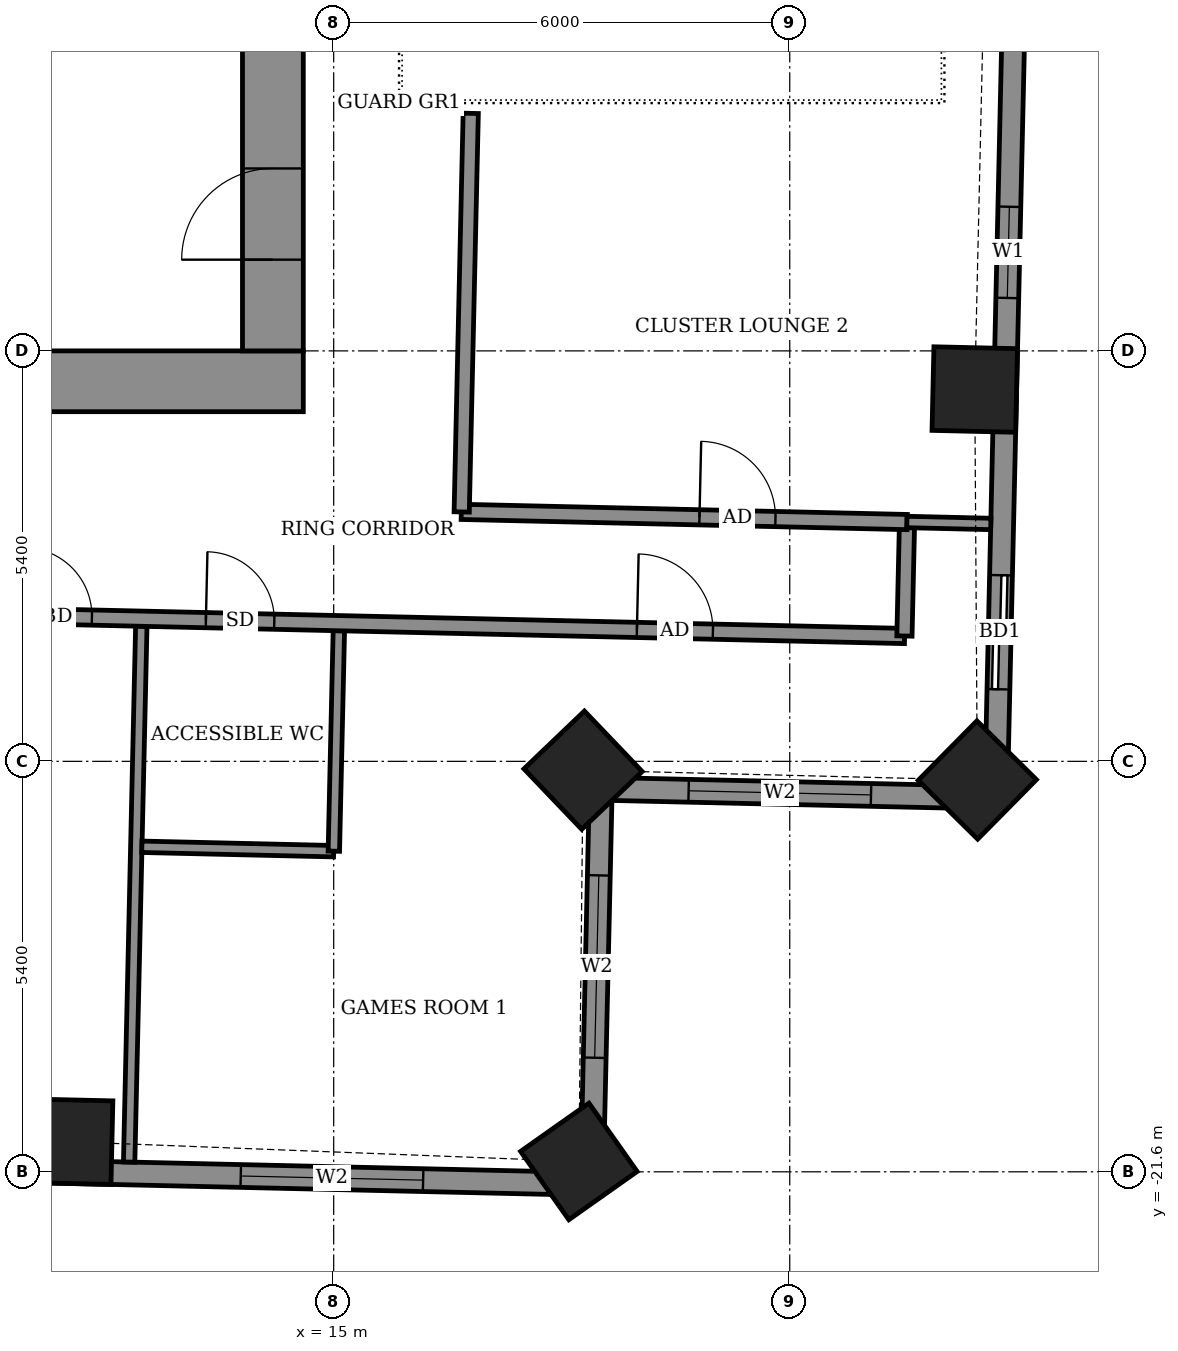
"""IFC4 building model, lengths in metres.
Left out: names, types, materials, properties, quantities, classifications, styles, units other than length and angle.
Written with IfcOpenShell. Run it as: python <this file> out.ifc"""

import sys

from ifc_helpers import new_model, si_unit, direction, frame, frame_2d, origin, origin_2d, place, context, subcontext, project, spatial, rectangle, extrude, element, fill, save


model = new_model("IFC4")
c1 = context("Model", 3, precision=1e-05, world=origin(), true_north=direction((0.0, 1.0)))
c2 = subcontext(c1, "Body", "Model", "MODEL_VIEW")
j1 = project(units=[si_unit("LENGTHUNIT", "METRE"), si_unit("PLANEANGLEUNIT", "RADIAN")], contexts=[c1])
p1 = place(None, origin())
s1 = spatial("IfcSite", under=j1, at=p1, CompositionType="ELEMENT")
p2 = place(p1, origin())
s2 = spatial("IfcBuilding", under=s1, at=p2, CompositionType="ELEMENT")
p3 = place(p2, frame((0.0, 0.0, 208.7)))
s3 = spatial("IfcBuildingStorey", under=s2, at=p3, CompositionType="ELEMENT", Elevation=208.7)
for number, where, z_axis, x_axis in (
    (1, (11.532, -21.204, -0.55), (0.0, 0.0, 1.0), (1.0, -0.023, 0.0)),
    (2, (18.226, -21.464, -0.55), (0.0, 0.0, 1.0), (0.817, 0.577, 0.0)),
    (3, (18.281, -16.316, -0.55), (0.0, 0.0, 1.0), (0.723, 0.691, 0.0)),
    (4, (23.468, -16.446, -0.55), (0.0, 0.0, 1.0), (0.702, 0.712, 0.0)),
    (5, (23.434, -11.309, -0.55), (0.0, 0.0, 1.0), (0.023, 1.0, 0.0)),
):
    element("IfcColumn", number, at=place(p3, frame(where, z_axis=z_axis, x_axis=x_axis)), inside=s3, PredefinedType="COLUMN", context=c2, shape_type="SweptSolid", body=[
        extrude(rectangle(XDim=1.1, YDim=1.1, at=origin_2d()), origin(), (0.0, 0.0, 1.0), 3.6),
    ])
p4 = place(p3, frame((23.713, -16.679, 0.0), z_axis=(0.0, 0.0, 1.0), x_axis=(0.022674801414, 0.999742893639, 0.0)))
e6 = element("IfcWall", 6, at=p4, inside=s3, PredefinedType="SOLIDWALL", context=c2, shape_type="SweptSolid", body=[
    extrude(rectangle(XDim=11.424, YDim=0.3, at=frame_2d((5.712, 0.0))), origin(), (0.0, 0.0, 1.0), 2.55),
])
p5 = place(p4, frame((1.428, 0.0, 0.0)))
e7 = element("IfcOpeningElement", 7, at=p5, cuts=e6, PredefinedType="OPENING", context=c2, shape_type="SweptSolid", body=[
    extrude(rectangle(XDim=1.5, YDim=2.4, at=frame_2d((0.75, 1.2))), frame((0.0, 0.16, 0.0), z_axis=(0.0, -1.0, 0.0), x_axis=(1.0, 0.0, 0.0)), (0.0, 0.0, 1.0), 0.32),
])
p6 = place(p4, frame((6.577, 0.0, 0.9)))
e8 = element("IfcOpeningElement", 8, at=p6, cuts=e6, PredefinedType="OPENING", context=c2, shape_type="SweptSolid", body=[
    extrude(rectangle(XDim=1.2, YDim=1.5, at=frame_2d((0.6, 0.75))), frame((0.0, 0.16, 0.0), z_axis=(0.0, -1.0, 0.0), x_axis=(1.0, 0.0, 0.0)), (0.0, 0.0, 1.0), 0.32),
])
p7 = place(p3, frame((-23.437, -20.81, 0.0), z_axis=(0.0, 0.0, 1.0), x_axis=(0.999742269115, -0.022702320244, 0.0)))
e9 = element("IfcWall", 9, at=p7, inside=s3, PredefinedType="SOLIDWALL", context=c2, shape_type="SweptSolid", body=[
    extrude(rectangle(XDim=41.844, YDim=0.3, at=frame_2d((20.922, 0.0))), origin(), (0.0, 0.0, 1.0), 2.55),
])
p8 = place(p7, frame((1.825, 0.0, 0.0)))
e10 = element("IfcOpeningElement", 10, at=p8, cuts=e9, PredefinedType="OPENING", context=c2, shape_type="SweptSolid", body=[
    extrude(rectangle(XDim=1.5, YDim=2.4, at=frame_2d((0.75, 1.2))), frame((0.0, 0.16, 0.0), z_axis=(0.0, -1.0, 0.0), x_axis=(1.0, 0.0, 0.0)), (0.0, 0.0, 1.0), 0.32),
])
p9 = place(p7, frame((4.937, 0.0, 0.0)))
e11 = element("IfcOpeningElement", 11, at=p9, cuts=e9, PredefinedType="OPENING", context=c2, shape_type="SweptSolid", body=[
    extrude(rectangle(XDim=1.2, YDim=2.4, at=frame_2d((0.6, 1.2))), frame((0.0, 0.16, 0.0), z_axis=(0.0, -1.0, 0.0), x_axis=(1.0, 0.0, 0.0)), (0.0, 0.0, 1.0), 0.32),
])
p10 = place(p7, frame((10.3, 0.0, 0.0)))
e12 = element("IfcOpeningElement", 12, at=p10, cuts=e9, PredefinedType="OPENING", context=c2, shape_type="SweptSolid", body=[
    extrude(rectangle(XDim=1.5, YDim=2.4, at=frame_2d((0.75, 1.2))), frame((0.0, 0.16, 0.0), z_axis=(0.0, -1.0, 0.0), x_axis=(1.0, 0.0, 0.0)), (0.0, 0.0, 1.0), 0.32),
])
p11 = place(p7, frame((15.224, 0.0, 0.0)))
e13 = element("IfcOpeningElement", 13, at=p11, cuts=e9, PredefinedType="OPENING", context=c2, shape_type="SweptSolid", body=[
    extrude(rectangle(XDim=1.5, YDim=2.4, at=frame_2d((0.75, 1.2))), frame((0.0, 0.16, 0.0), z_axis=(0.0, -1.0, 0.0), x_axis=(1.0, 0.0, 0.0)), (0.0, 0.0, 1.0), 0.32),
])
p12 = place(p7, frame((18.436, 0.0, 0.0)))
e14 = element("IfcOpeningElement", 14, at=p12, cuts=e9, PredefinedType="OPENING", context=c2, shape_type="SweptSolid", body=[
    extrude(rectangle(XDim=1.5, YDim=2.4, at=frame_2d((0.75, 1.2))), frame((0.0, 0.16, 0.0), z_axis=(0.0, -1.0, 0.0), x_axis=(1.0, 0.0, 0.0)), (0.0, 0.0, 1.0), 0.32),
])
p13 = place(p7, frame((23.825, 0.0, 0.0)))
e15 = element("IfcOpeningElement", 15, at=p13, cuts=e9, PredefinedType="OPENING", context=c2, shape_type="SweptSolid", body=[
    extrude(rectangle(XDim=1.5, YDim=2.4, at=frame_2d((0.75, 1.2))), frame((0.0, 0.16, 0.0), z_axis=(0.0, -1.0, 0.0), x_axis=(1.0, 0.0, 0.0)), (0.0, 0.0, 1.0), 0.32),
])
p14 = place(p7, frame((28.948, 0.0, 0.0)))
e16 = element("IfcOpeningElement", 16, at=p14, cuts=e9, PredefinedType="OPENING", context=c2, shape_type="SweptSolid", body=[
    extrude(rectangle(XDim=1.5, YDim=2.4, at=frame_2d((0.75, 1.2))), frame((0.0, 0.16, 0.0), z_axis=(0.0, -1.0, 0.0), x_axis=(1.0, 0.0, 0.0)), (0.0, 0.0, 1.0), 0.32),
])
p15 = place(p7, frame((32.16, 0.0, 0.0)))
e17 = element("IfcOpeningElement", 17, at=p15, cuts=e9, PredefinedType="OPENING", context=c2, shape_type="SweptSolid", body=[
    extrude(rectangle(XDim=1.5, YDim=2.4, at=frame_2d((0.75, 1.2))), frame((0.0, 0.16, 0.0), z_axis=(0.0, -1.0, 0.0), x_axis=(1.0, 0.0, 0.0)), (0.0, 0.0, 1.0), 0.32),
])
p16 = place(p7, frame((37.224, 0.0, 0.9)))
e18 = element("IfcOpeningElement", 18, at=p16, cuts=e9, PredefinedType="OPENING", context=c2, shape_type="SweptSolid", body=[
    extrude(rectangle(XDim=2.4, YDim=1.5, at=frame_2d((1.2, 0.75))), frame((0.0, 0.16, 0.0), z_axis=(0.0, -1.0, 0.0), x_axis=(1.0, 0.0, 0.0)), (0.0, 0.0, 1.0), 0.32),
])
p17 = place(p3, frame((18.396, -21.76, 0.0), z_axis=(0.0, 0.0, 1.0), x_axis=(0.022675548694, 0.99974287669, 0.0)))
e19 = element("IfcWall", 19, at=p17, inside=s3, PredefinedType="SOLIDWALL", context=c2, shape_type="SweptSolid", body=[
    extrude(rectangle(XDim=5.2, YDim=0.3, at=frame_2d((2.6, 0.0))), origin(), (0.0, 0.0, 1.0), 2.55),
])
p18 = place(p17, frame((1.661, 0.0, 0.9)))
e20 = element("IfcOpeningElement", 20, at=p18, cuts=e19, PredefinedType="OPENING", context=c2, shape_type="SweptSolid", body=[
    extrude(rectangle(XDim=2.4, YDim=1.5, at=frame_2d((1.2, 0.75))), frame((0.0, 0.16, 0.0), z_axis=(0.0, -1.0, 0.0), x_axis=(1.0, 0.0, 0.0)), (0.0, 0.0, 1.0), 0.32),
])
p19 = place(p3, frame((18.514, -16.561, 0.0), z_axis=(0.0, 0.0, 1.0), x_axis=(0.99974287669, -0.022675548694, 0.0)))
e21 = element("IfcWall", 21, at=p19, inside=s3, PredefinedType="SOLIDWALL", context=c2, shape_type="SweptSolid", body=[
    extrude(rectangle(XDim=5.2, YDim=0.3, at=frame_2d((2.6, 0.0))), origin(), (0.0, 0.0, 1.0), 2.55),
])
p20 = place(p19, frame((1.156, 0.0, 0.9)))
e22 = element("IfcOpeningElement", 22, at=p20, cuts=e21, PredefinedType="OPENING", context=c2, shape_type="SweptSolid", body=[
    extrude(rectangle(XDim=2.4, YDim=1.5, at=frame_2d((1.2, 0.75))), frame((0.0, 0.16, 0.0), z_axis=(0.0, -1.0, 0.0), x_axis=(1.0, 0.0, 0.0)), (0.0, 0.0, 1.0), 0.32),
])
p21 = place(p3, frame((12.309, -21.472, 0.0), z_axis=(0.0, 0.0, 1.0), x_axis=(0.022680503969, 0.999742764285, 0.0)))
e23 = element("IfcWall", 23, at=p21, inside=s3, PredefinedType="PARTITIONING", context=c2, shape_type="SweptSolid", body=[
    extrude(rectangle(XDim=7.051, YDim=0.15, at=frame_2d((3.525, 0.0))), origin(), (0.0, 0.0, 1.0), 2.55),
])
p22 = place(p3, frame((12.476, -17.324, 0.0), z_axis=(0.0, 0.0, 1.0), x_axis=(0.999735102249, -0.023015762656, 0.0)))
e24 = element("IfcWall", 24, at=p22, inside=s3, PredefinedType="PARTITIONING", context=c2, shape_type="SweptSolid", body=[
    extrude(rectangle(XDim=2.525, YDim=0.15, at=frame_2d((1.262, 0.0))), origin(), (0.0, 0.0, 1.0), 3.05),
])
p23 = place(p3, frame((15.002, -17.382, 0.0), z_axis=(0.0, 0.0, 1.0), x_axis=(0.022807433839, 0.999739876649, 0.0)))
e25 = element("IfcWall", 25, at=p23, inside=s3, PredefinedType="PARTITIONING", context=c2, shape_type="SweptSolid", body=[
    extrude(rectangle(XDim=2.901, YDim=0.15, at=frame_2d((1.45, 0.0))), origin(), (0.0, 0.0, 1.0), 3.05),
])
p24 = place(p3, frame((-26.421, -13.441, 0.0), z_axis=(0.0, 0.0, 1.0), x_axis=(0.999742754064, -0.022680954485, 0.0)))
e26 = element("IfcWall", 26, at=p24, inside=s3, PredefinedType="PARTITIONING", context=c2, shape_type="SweptSolid", body=[
    extrude(rectangle(XDim=48.945, YDim=0.2, at=frame_2d((24.472, 0.0))), origin(), (0.0, 0.0, 1.0), 3.05),
])
p25 = place(p24, frame((1.425, 0.0, 0.0)))
e27 = element("IfcOpeningElement", 27, at=p25, cuts=e26, PredefinedType="OPENING", context=c2, shape_type="SweptSolid", body=[
    extrude(rectangle(XDim=1.0, YDim=2.1, at=frame_2d((0.5, 1.05))), frame((0.0, 0.11, 0.0), z_axis=(0.0, -1.0, 0.0), x_axis=(1.0, 0.0, 0.0)), (0.0, 0.0, 1.0), 0.22),
])
p26 = place(p24, frame((6.0, 0.0, 0.0)))
e28 = element("IfcOpeningElement", 28, at=p26, cuts=e26, PredefinedType="OPENING", context=c2, shape_type="SweptSolid", body=[
    extrude(rectangle(XDim=0.9, YDim=2.1, at=frame_2d((0.45, 1.05))), frame((0.0, 0.11, 0.0), z_axis=(0.0, -1.0, 0.0), x_axis=(1.0, 0.0, 0.0)), (0.0, 0.0, 1.0), 0.22),
])
p27 = place(p24, frame((10.55, 0.0, 0.0)))
e29 = element("IfcOpeningElement", 29, at=p27, cuts=e26, PredefinedType="OPENING", context=c2, shape_type="SweptSolid", body=[
    extrude(rectangle(XDim=0.9, YDim=2.1, at=frame_2d((0.45, 1.05))), frame((0.0, 0.11, 0.0), z_axis=(0.0, -1.0, 0.0), x_axis=(1.0, 0.0, 0.0)), (0.0, 0.0, 1.0), 0.22),
])
p28 = place(p24, frame((12.55, 0.0, 0.0)))
e30 = element("IfcOpeningElement", 30, at=p28, cuts=e26, PredefinedType="OPENING", context=c2, shape_type="SweptSolid", body=[
    extrude(rectangle(XDim=0.9, YDim=2.1, at=frame_2d((0.45, 1.05))), frame((0.0, 0.11, 0.0), z_axis=(0.0, -1.0, 0.0), x_axis=(1.0, 0.0, 0.0)), (0.0, 0.0, 1.0), 0.22),
])
p29 = place(p24, frame((19.425, 0.0, 0.0)))
e31 = element("IfcOpeningElement", 31, at=p29, cuts=e26, PredefinedType="OPENING", context=c2, shape_type="SweptSolid", body=[
    extrude(rectangle(XDim=0.9, YDim=2.1, at=frame_2d((0.45, 1.05))), frame((0.0, 0.11, 0.0), z_axis=(0.0, -1.0, 0.0), x_axis=(1.0, 0.0, 0.0)), (0.0, 0.0, 1.0), 0.22),
])
p30 = place(p24, frame((21.525, 0.0, 0.0)))
e32 = element("IfcOpeningElement", 32, at=p30, cuts=e26, PredefinedType="OPENING", context=c2, shape_type="SweptSolid", body=[
    extrude(rectangle(XDim=0.9, YDim=2.1, at=frame_2d((0.45, 1.05))), frame((0.0, 0.11, 0.0), z_axis=(0.0, -1.0, 0.0), x_axis=(1.0, 0.0, 0.0)), (0.0, 0.0, 1.0), 0.22),
])
p31 = place(p24, frame((28.475, 0.0, 0.0)))
e33 = element("IfcOpeningElement", 33, at=p31, cuts=e26, PredefinedType="OPENING", context=c2, shape_type="SweptSolid", body=[
    extrude(rectangle(XDim=0.9, YDim=2.1, at=frame_2d((0.45, 1.05))), frame((0.0, 0.11, 0.0), z_axis=(0.0, -1.0, 0.0), x_axis=(1.0, 0.0, 0.0)), (0.0, 0.0, 1.0), 0.22),
])
p32 = place(p24, frame((30.5, 0.0, 0.0)))
e34 = element("IfcOpeningElement", 34, at=p32, cuts=e26, PredefinedType="OPENING", context=c2, shape_type="SweptSolid", body=[
    extrude(rectangle(XDim=0.9, YDim=2.1, at=frame_2d((0.45, 1.05))), frame((0.0, 0.11, 0.0), z_axis=(0.0, -1.0, 0.0), x_axis=(1.0, 0.0, 0.0)), (0.0, 0.0, 1.0), 0.22),
])
p33 = place(p24, frame((37.35, 0.0, 0.0)))
e35 = element("IfcOpeningElement", 35, at=p33, cuts=e26, PredefinedType="OPENING", context=c2, shape_type="SweptSolid", body=[
    extrude(rectangle(XDim=0.9, YDim=2.1, at=frame_2d((0.45, 1.05))), frame((0.0, 0.11, 0.0), z_axis=(0.0, -1.0, 0.0), x_axis=(1.0, 0.0, 0.0)), (0.0, 0.0, 1.0), 0.22),
])
p34 = place(p24, frame((45.422, 0.0, 0.0)))
e36 = element("IfcOpeningElement", 36, at=p34, cuts=e26, PredefinedType="OPENING", context=c2, shape_type="SweptSolid", body=[
    extrude(rectangle(XDim=1.0, YDim=2.1, at=frame_2d((0.5, 1.05))), frame((0.0, 0.11, 0.0), z_axis=(0.0, -1.0, 0.0), x_axis=(1.0, 0.0, 0.0)), (0.0, 0.0, 1.0), 0.22),
])
p35 = place(p24, frame((39.75, 0.0, 0.0)))
e37 = element("IfcOpeningElement", 37, at=p35, cuts=e26, PredefinedType="OPENING", context=c2, shape_type="SweptSolid", body=[
    extrude(rectangle(XDim=0.9, YDim=2.1, at=frame_2d((0.45, 1.05))), frame((0.0, 0.11, 0.0), z_axis=(0.0, -1.0, 0.0), x_axis=(1.0, 0.0, 0.0)), (0.0, 0.0, 1.0), 0.22),
])
p36 = place(p3, frame((22.509, -14.551, 0.0), z_axis=(0.0, 0.0, 1.0), x_axis=(0.022632637625, 0.99974384905, 0.0)))
e38 = element("IfcWall", 38, at=p36, inside=s3, PredefinedType="PARTITIONING", context=c2, shape_type="SweptSolid", body=[
    extrude(rectangle(XDim=1.5, YDim=0.2, at=frame_2d((0.75, 0.0))), origin(), (0.0, 0.0, 1.0), 3.05),
])
p37 = place(p3, frame((16.679, -12.918, 0.0), z_axis=(0.0, 0.0, 1.0), x_axis=(0.999739057042, -0.022843332181, 0.0)))
e39 = element("IfcWall", 39, at=p37, inside=s3, PredefinedType="PARTITIONING", context=c2, shape_type="SweptSolid", body=[
    extrude(rectangle(XDim=5.867, YDim=0.2, at=frame_2d((2.934, 0.0))), origin(), (0.0, 0.0, 1.0), 3.05),
])
p38 = place(p37, frame((3.134, 0.0, 0.0)))
e40 = element("IfcOpeningElement", 40, at=p38, cuts=e39, PredefinedType="OPENING", context=c2, shape_type="SweptSolid", body=[
    extrude(rectangle(XDim=1.0, YDim=2.1, at=frame_2d((0.5, 1.05))), frame((0.0, 0.11, 0.0), z_axis=(0.0, -1.0, 0.0), x_axis=(1.0, 0.0, 0.0)), (0.0, 0.0, 1.0), 0.22),
])
p39 = place(p3, frame((16.684, -12.919, 0.0), z_axis=(0.0, 0.0, 1.0), x_axis=(0.022667483124, 0.999743059595, 0.0)))
e41 = element("IfcWall", 41, at=p39, inside=s3, PredefinedType="PARTITIONING", context=c2, shape_type="SweptSolid", body=[
    extrude(rectangle(XDim=5.245, YDim=0.2, at=frame_2d((2.623, 0.0))), origin(), (0.0, 0.0, 1.0), 3.05),
])
p40 = place(p3, frame((22.541, -13.051, 0.0), z_axis=(0.0, 0.0, 1.0), x_axis=(0.999725373977, -0.023434517833, 0.0)))
e42 = element("IfcWall", 42, at=p40, inside=s3, PredefinedType="PARTITIONING", context=c2, shape_type="SweptSolid", body=[
    extrude(rectangle(XDim=1.104, YDim=0.15, at=frame_2d((0.552, 0.0))), origin(), (0.0, 0.0, 1.0), 2.55),
])
p41 = place(p3, frame((-14.6, -11.2, 0.0), z_axis=(0.0, 0.0, 1.0), x_axis=(1.0, 0.0, 0.0)))
e43 = element("IfcWall", 43, at=p41, inside=s3, PredefinedType="SHEAR", context=c2, shape_type="SweptSolid", body=[
    extrude(rectangle(XDim=29.2, YDim=0.8, at=frame_2d((14.6, 0.0))), origin(), (0.0, 0.0, 1.0), 3.6),
])
p42 = place(p3, frame((14.2, -10.8, 0.0), z_axis=(0.0, 0.0, 1.0), x_axis=(0.0, 1.0, 0.0)))
e44 = element("IfcWall", 44, at=p42, inside=s3, PredefinedType="SHEAR", context=c2, shape_type="SweptSolid", body=[
    extrude(rectangle(XDim=21.6, YDim=0.8, at=frame_2d((10.8, 0.0))), origin(), (0.0, 0.0, 1.0), 3.6),
])
p43 = place(p42, frame((1.2, 0.0, 0.0)))
e45 = element("IfcOpeningElement", 45, at=p43, cuts=e44, PredefinedType="OPENING", context=c2, shape_type="SweptSolid", body=[
    extrude(rectangle(XDim=1.2, YDim=2.1, at=frame_2d((0.6, 1.05))), frame((0.0, 0.41, 0.0), z_axis=(0.0, -1.0, 0.0), x_axis=(1.0, 0.0, 0.0)), (0.0, 0.0, 1.0), 0.82),
])
p44 = place(p5, origin())
e46 = element("IfcDoor", 46, at=p44, inside=s3, OperationType="SLIDING_TO_LEFT", PredefinedType="DOOR", context=c2, shape_type="SweptSolid", body=[
    extrude(rectangle(XDim=1.5, YDim=2.4, at=frame_2d((0.75, 1.2))), frame((0.0, 0.025, 0.0), z_axis=(0.0, -1.0, 0.0), x_axis=(1.0, 0.0, 0.0)), (0.0, 0.0, 1.0), 0.05),
])
fill(e7, e46)
p45 = place(p6, origin())
e47 = element("IfcWindow", 47, at=p45, inside=s3, PartitioningType="SINGLE_PANEL", PredefinedType="WINDOW", context=c2, shape_type="SweptSolid", body=[
    extrude(rectangle(XDim=1.2, YDim=1.5, at=frame_2d((0.6, 0.75))), frame((0.0, 0.03, 0.0), z_axis=(0.0, -1.0, 0.0), x_axis=(1.0, 0.0, 0.0)), (0.0, 0.0, 1.0), 0.06),
])
fill(e8, e47)
p46 = place(p16, origin())
e48 = element("IfcWindow", 48, at=p46, inside=s3, PartitioningType="DOUBLE_PANEL_VERTICAL", PredefinedType="WINDOW", context=c2, shape_type="SweptSolid", body=[
    extrude(rectangle(XDim=2.4, YDim=1.5, at=frame_2d((1.2, 0.75))), frame((0.0, 0.03, 0.0), z_axis=(0.0, -1.0, 0.0), x_axis=(1.0, 0.0, 0.0)), (0.0, 0.0, 1.0), 0.06),
])
fill(e18, e48)
p47 = place(p18, origin())
e49 = element("IfcWindow", 49, at=p47, inside=s3, PartitioningType="DOUBLE_PANEL_VERTICAL", PredefinedType="WINDOW", context=c2, shape_type="SweptSolid", body=[
    extrude(rectangle(XDim=2.4, YDim=1.5, at=frame_2d((1.2, 0.75))), frame((0.0, 0.03, 0.0), z_axis=(0.0, -1.0, 0.0), x_axis=(1.0, 0.0, 0.0)), (0.0, 0.0, 1.0), 0.06),
])
fill(e20, e49)
p48 = place(p20, origin())
e50 = element("IfcWindow", 50, at=p48, inside=s3, PartitioningType="DOUBLE_PANEL_VERTICAL", PredefinedType="WINDOW", context=c2, shape_type="SweptSolid", body=[
    extrude(rectangle(XDim=2.4, YDim=1.5, at=frame_2d((1.2, 0.75))), frame((0.0, 0.03, 0.0), z_axis=(0.0, -1.0, 0.0), x_axis=(1.0, 0.0, 0.0)), (0.0, 0.0, 1.0), 0.06),
])
fill(e22, e50)
p49 = place(p33, origin())
e51 = element("IfcDoor", 51, at=p49, inside=s3, OperationType="SINGLE_SWING_LEFT", PredefinedType="DOOR", context=c2, shape_type="SweptSolid", body=[
    extrude(rectangle(XDim=0.9, YDim=2.1, at=frame_2d((0.45, 1.05))), frame((0.0, 0.025, 0.0), z_axis=(0.0, -1.0, 0.0), x_axis=(1.0, 0.0, 0.0)), (0.0, 0.0, 1.0), 0.05),
])
fill(e35, e51)
p50 = place(p34, origin())
e52 = element("IfcDoor", 52, at=p50, inside=s3, OperationType="SINGLE_SWING_RIGHT", PredefinedType="DOOR", context=c2, shape_type="SweptSolid", body=[
    extrude(rectangle(XDim=1.0, YDim=2.1, at=frame_2d((0.5, 1.05))), frame((0.0, 0.025, 0.0), z_axis=(0.0, -1.0, 0.0), x_axis=(1.0, 0.0, 0.0)), (0.0, 0.0, 1.0), 0.05),
])
fill(e36, e52)
p51 = place(p35, origin())
e53 = element("IfcDoor", 53, at=p51, inside=s3, OperationType="SINGLE_SWING_RIGHT", PredefinedType="DOOR", context=c2, shape_type="SweptSolid", body=[
    extrude(rectangle(XDim=0.9, YDim=2.1, at=frame_2d((0.45, 1.05))), frame((0.0, 0.025, 0.0), z_axis=(0.0, -1.0, 0.0), x_axis=(1.0, 0.0, 0.0)), (0.0, 0.0, 1.0), 0.05),
])
fill(e37, e53)
p52 = place(p38, origin())
e54 = element("IfcDoor", 54, at=p52, inside=s3, OperationType="SINGLE_SWING_LEFT", PredefinedType="DOOR", context=c2, shape_type="SweptSolid", body=[
    extrude(rectangle(XDim=1.0, YDim=2.1, at=frame_2d((0.5, 1.05))), frame((0.0, 0.025, 0.0), z_axis=(0.0, -1.0, 0.0), x_axis=(1.0, 0.0, 0.0)), (0.0, 0.0, 1.0), 0.05),
])
fill(e40, e54)
p53 = place(p43, origin())
e55 = element("IfcDoor", 55, at=p53, inside=s3, OperationType="DOUBLE_DOOR_SINGLE_SWING", PredefinedType="DOOR", context=c2, shape_type="SweptSolid", body=[
    extrude(rectangle(XDim=1.2, YDim=2.1, at=frame_2d((0.6, 1.05))), frame((0.0, 0.025, 0.0), z_axis=(0.0, -1.0, 0.0), x_axis=(1.0, 0.0, 0.0)), (0.0, 0.0, 1.0), 0.05),
])
fill(e45, e55)
save(model, sys.argv[1])
